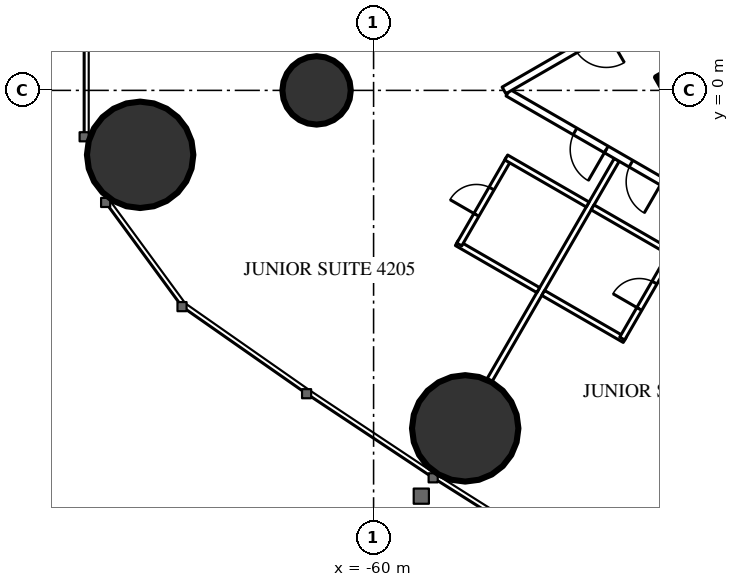
"""IFC4 building model, lengths in metres.
Left out: names, types, materials, properties, quantities, classifications, styles, units other than length and angle.
Written with IfcOpenShell. Run it as: python <this file> out.ifc"""

import sys

from ifc_helpers import new_model, si_unit, direction, frame, frame_2d, origin, origin_2d, place, context, subcontext, project, spatial, rectangle, circle, extrude, element, fill, save


model = new_model("IFC4")
c1 = context("Model", 3, precision=1e-05, world=origin(), true_north=direction((0.0, 1.0)))
c2 = subcontext(c1, "Body", "Model", "MODEL_VIEW")
j1 = project(units=[si_unit("LENGTHUNIT", "METRE"), si_unit("PLANEANGLEUNIT", "RADIAN")], contexts=[c1])
p1 = place(None, origin())
s1 = spatial("IfcSite", under=j1, at=p1, CompositionType="ELEMENT")
p2 = place(p1, origin())
s2 = spatial("IfcBuilding", under=s1, at=p2, CompositionType="ELEMENT")
p3 = place(p2, frame((0.0, 0.0, 159.8)))
s3 = spatial("IfcBuildingStorey", under=s2, at=p3, CompositionType="ELEMENT", Elevation=159.8)
for number, where, z_axis, x_axis in (
    (1, (-66.143, -1.695, 0.0), (0.0, 0.0, 1.0), (1.0, 0.0, 0.0)),
    (2, (-57.59, -8.893, 0.0), (0.0, 0.0, 1.0), (1.0, 0.0, 0.0)),
):
    element("IfcColumn", number, at=place(p3, frame(where, z_axis=z_axis, x_axis=x_axis)), inside=s3, PredefinedType="COLUMN", context=c2, shape_type="SweptSolid", body=[
        extrude(circle(Radius=1.4, at=origin_2d()), origin(), (0.0, 0.0, 1.0), 3.5),
    ])
p4 = place(p3, frame((-61.5, 0.0, 0.0), z_axis=(0.0, 0.0, 1.0), x_axis=(1.0, 0.0, 0.0)))
e3 = element("IfcColumn", 3, at=p4, inside=s3, PredefinedType="COLUMN", context=c2, shape_type="SweptSolid", body=[
    extrude(circle(Radius=0.9, at=origin_2d()), origin(), (0.0, 0.0, 1.0), 3.5),
])
p5 = place(p3, frame((-27.2, 14.3, 0.0), z_axis=(0.0, 0.0, 1.0), x_axis=(-0.866026593062, -0.499997940104, 0.0)))
e4 = element("IfcWall", 4, at=p5, inside=s3, PredefinedType="SHEAR", context=c2, shape_type="SweptSolid", body=[
    extrude(rectangle(XDim=28.946, YDim=1.2, at=frame_2d((14.473, 0.0))), origin(), (0.0, 0.0, 1.0), 3.5),
])
p6 = place(p5, frame((4.6, 0.0, 0.0)))
e5 = element("IfcOpeningElement", 5, at=p6, cuts=e4, PredefinedType="OPENING", context=c2, shape_type="SweptSolid", body=[
    extrude(rectangle(XDim=1.0, YDim=2.2, at=frame_2d((0.5, 1.1))), frame((0.0, 0.61, 0.0), z_axis=(0.0, -1.0, 0.0), x_axis=(1.0, 0.0, 0.0)), (0.0, 0.0, 1.0), 1.22),
])
p7 = place(p5, frame((13.395, 0.0, 0.0)))
e6 = element("IfcOpeningElement", 6, at=p7, cuts=e4, PredefinedType="OPENING", context=c2, shape_type="SweptSolid", body=[
    extrude(rectangle(XDim=1.8, YDim=2.2, at=frame_2d((0.9, 1.1))), frame((0.0, 0.61, 0.0), z_axis=(0.0, -1.0, 0.0), x_axis=(1.0, 0.0, 0.0)), (0.0, 0.0, 1.0), 1.22),
])
p8 = place(p3, frame((-53.602, -1.828, 0.0), z_axis=(0.0, 0.0, 1.0), x_axis=(-0.49999191814, -0.866030069798, 0.0)))
e7 = element("IfcWall", 7, at=p8, inside=s3, PredefinedType="PARTITIONING", context=c2, shape_type="SweptSolid", body=[
    extrude(rectangle(XDim=6.692, YDim=0.15, at=frame_2d((3.346, 0.0))), origin(), (0.0, 0.0, 1.0), 2.3),
])
p9 = place(p3, frame((-44.715, -6.844, 0.0), z_axis=(0.0, 0.0, 1.0), x_axis=(-0.866025261224, 0.500000246922, 0.0)))
e8 = element("IfcWall", 8, at=p9, inside=s3, PredefinedType="PARTITIONING", context=c2, shape_type="SweptSolid", body=[
    extrude(rectangle(XDim=13.567, YDim=0.2, at=frame_2d((6.783, 0.0))), origin(), (0.0, 0.0, 1.0), 3.25),
])
p10 = place(p9, frame((10.579, 0.0, 0.0)))
e9 = element("IfcOpeningElement", 9, at=p10, cuts=e8, PredefinedType="OPENING", context=c2, shape_type="SweptSolid", body=[
    extrude(rectangle(XDim=0.95, YDim=2.2, at=frame_2d((0.475, 1.1))), frame((0.0, 0.11, 0.0), z_axis=(0.0, -1.0, 0.0), x_axis=(1.0, 0.0, 0.0)), (0.0, 0.0, 1.0), 0.22),
])
p11 = place(p9, frame((8.879, 0.0, 0.0)))
e10 = element("IfcOpeningElement", 10, at=p11, cuts=e8, PredefinedType="OPENING", context=c2, shape_type="SweptSolid", body=[
    extrude(rectangle(XDim=0.95, YDim=2.2, at=frame_2d((0.475, 1.1))), frame((0.0, 0.11, 0.0), z_axis=(0.0, -1.0, 0.0), x_axis=(1.0, 0.0, 0.0)), (0.0, 0.0, 1.0), 0.22),
])
p12 = place(p9, frame((0.5, 0.0, 0.0)))
e11 = element("IfcOpeningElement", 11, at=p12, cuts=e8, PredefinedType="OPENING", context=c2, shape_type="SweptSolid", body=[
    extrude(rectangle(XDim=1.435, YDim=2.2, at=frame_2d((0.718, 1.1))), frame((0.0, 0.11, 0.0), z_axis=(0.0, -1.0, 0.0), x_axis=(1.0, 0.0, 0.0)), (0.0, 0.0, 1.0), 0.22),
])
p13 = place(p3, frame((-46.65, 5.726, 0.0), z_axis=(0.0, 0.0, 1.0), x_axis=(-0.866027963864, -0.499995565786, 0.0)))
e12 = element("IfcWall", 12, at=p13, inside=s3, PredefinedType="PARTITIONING", context=c2, shape_type="SweptSolid", body=[
    extrude(rectangle(XDim=11.452, YDim=0.2, at=frame_2d((5.726, 0.0))), origin(), (0.0, 0.0, 1.0), 3.25),
])
p14 = place(p13, frame((4.294, 0.0, 0.0)))
e13 = element("IfcOpeningElement", 13, at=p14, cuts=e12, PredefinedType="OPENING", context=c2, shape_type="SweptSolid", body=[
    extrude(rectangle(XDim=0.95, YDim=2.2, at=frame_2d((0.475, 1.1))), frame((0.0, 0.11, 0.0), z_axis=(0.0, -1.0, 0.0), x_axis=(1.0, 0.0, 0.0)), (0.0, 0.0, 1.0), 0.22),
])
p15 = place(p13, frame((8.344, 0.0, 0.0)))
e14 = element("IfcOpeningElement", 14, at=p15, cuts=e12, PredefinedType="OPENING", context=c2, shape_type="SweptSolid", body=[
    extrude(rectangle(XDim=0.95, YDim=2.2, at=frame_2d((0.475, 1.1))), frame((0.0, 0.11, 0.0), z_axis=(0.0, -1.0, 0.0), x_axis=(1.0, 0.0, 0.0)), (0.0, 0.0, 1.0), 0.22),
])
p16 = place(p3, frame((-55.667, -5.255, 0.0), z_axis=(0.0, 0.0, 1.0), x_axis=(-0.866006523861, 0.500032699561, 0.0)))
e15 = element("IfcWall", 15, at=p16, inside=s3, PredefinedType="PARTITIONING", context=c2, shape_type="SweptSolid", body=[
    extrude(rectangle(XDim=2.475, YDim=0.15, at=frame_2d((1.237, 0.0))), origin(), (0.0, 0.0, 1.0), 3.25),
])
p17 = place(p3, frame((-56.446, -1.803, 0.0), z_axis=(0.0, 0.0, 1.0), x_axis=(-0.499936506574, -0.866062058628, 0.0)))
e16 = element("IfcWall", 16, at=p17, inside=s3, PredefinedType="PARTITIONING", context=c2, shape_type="SweptSolid", body=[
    extrude(rectangle(XDim=2.6, YDim=0.15, at=frame_2d((1.3, 0.0))), origin(), (0.0, 0.0, 1.0), 3.25),
])
p18 = place(p17, frame((0.9, 0.0, 0.0)))
e17 = element("IfcOpeningElement", 17, at=p18, cuts=e16, PredefinedType="OPENING", context=c2, shape_type="SweptSolid", body=[
    extrude(rectangle(XDim=0.8, YDim=2.2, at=frame_2d((0.4, 1.1))), frame((0.0, 0.085, 0.0), z_axis=(0.0, -1.0, 0.0), x_axis=(1.0, 0.0, 0.0)), (0.0, 0.0, 1.0), 0.17),
])
for number, where, z_axis, x_axis in (
    (18, (-54.367, -3.003, 0.0), (0.0, 0.0, 1.0), (-0.866, 0.5, 0.0)),
    (19, (-53.394, -6.567, 0.0), (0.0, 0.0, 1.0), (-0.866, 0.5, 0.0)),
):
    element("IfcWall", number, at=place(p3, frame(where, z_axis=z_axis, x_axis=x_axis)), inside=s3, PredefinedType="PARTITIONING", context=c2, shape_type="SweptSolid", body=[
        extrude(rectangle(XDim=2.475, YDim=0.15, at=frame_2d((1.238, 0.0))), origin(), (0.0, 0.0, 1.0), 3.25),
    ])
p19 = place(p3, frame((-52.159, -4.278, 0.0), z_axis=(0.0, 0.0, 1.0), x_axis=(-0.500047596559, -0.865997922154, 0.0)))
e20 = element("IfcWall", 20, at=p19, inside=s3, PredefinedType="PARTITIONING", context=c2, shape_type="SweptSolid", body=[
    extrude(rectangle(XDim=2.6, YDim=0.15, at=frame_2d((1.3, 0.0))), origin(), (0.0, 0.0, 1.0), 3.25),
])
p20 = place(p19, frame((0.9, 0.0, 0.0)))
e21 = element("IfcOpeningElement", 21, at=p20, cuts=e20, PredefinedType="OPENING", context=c2, shape_type="SweptSolid", body=[
    extrude(rectangle(XDim=0.8, YDim=2.2, at=frame_2d((0.4, 1.1))), frame((0.0, 0.085, 0.0), z_axis=(0.0, -1.0, 0.0), x_axis=(1.0, 0.0, 0.0)), (0.0, 0.0, 1.0), 0.17),
])
p21 = place(p3, frame((-52.094, -4.315, 0.0), z_axis=(0.0, 0.0, 1.0), x_axis=(-0.866006523861, 0.500032699561, 0.0)))
e22 = element("IfcWall", 22, at=p21, inside=s3, PredefinedType="PARTITIONING", context=c2, shape_type="SweptSolid", body=[
    extrude(rectangle(XDim=2.475, YDim=0.15, at=frame_2d((1.237, 0.0))), origin(), (0.0, 0.0, 1.0), 2.45),
])
p22 = place(p18, origin())
e23 = element("IfcDoor", 23, at=p22, inside=s3, OperationType="SINGLE_SWING_RIGHT", PredefinedType="DOOR", context=c2, shape_type="SweptSolid", body=[
    extrude(rectangle(XDim=0.8, YDim=2.2, at=frame_2d((0.4, 1.1))), frame((0.0, 0.025, 0.0), z_axis=(0.0, -1.0, 0.0), x_axis=(1.0, 0.0, 0.0)), (0.0, 0.0, 1.0), 0.05),
])
fill(e17, e23)
p23 = place(p10, origin())
e24 = element("IfcDoor", 24, at=p23, inside=s3, OperationType="SINGLE_SWING_LEFT", PredefinedType="DOOR", context=c2, shape_type="SweptSolid", body=[
    extrude(rectangle(XDim=0.95, YDim=2.2, at=frame_2d((0.475, 1.1))), frame((0.0, 0.025, 0.0), z_axis=(0.0, -1.0, 0.0), x_axis=(1.0, 0.0, 0.0)), (0.0, 0.0, 1.0), 0.05),
])
fill(e9, e24)
p24 = place(p20, origin())
e25 = element("IfcDoor", 25, at=p24, inside=s3, OperationType="SINGLE_SWING_RIGHT", PredefinedType="DOOR", context=c2, shape_type="SweptSolid", body=[
    extrude(rectangle(XDim=0.8, YDim=2.2, at=frame_2d((0.4, 1.1))), frame((0.0, 0.025, 0.0), z_axis=(0.0, -1.0, 0.0), x_axis=(1.0, 0.0, 0.0)), (0.0, 0.0, 1.0), 0.05),
])
fill(e21, e25)
p25 = place(p11, origin())
e26 = element("IfcDoor", 26, at=p25, inside=s3, OperationType="SINGLE_SWING_LEFT", PredefinedType="DOOR", context=c2, shape_type="SweptSolid", body=[
    extrude(rectangle(XDim=0.95, YDim=2.2, at=frame_2d((0.475, 1.1))), frame((0.0, 0.025, 0.0), z_axis=(0.0, -1.0, 0.0), x_axis=(1.0, 0.0, 0.0)), (0.0, 0.0, 1.0), 0.05),
])
fill(e10, e26)
save(model, sys.argv[1])
